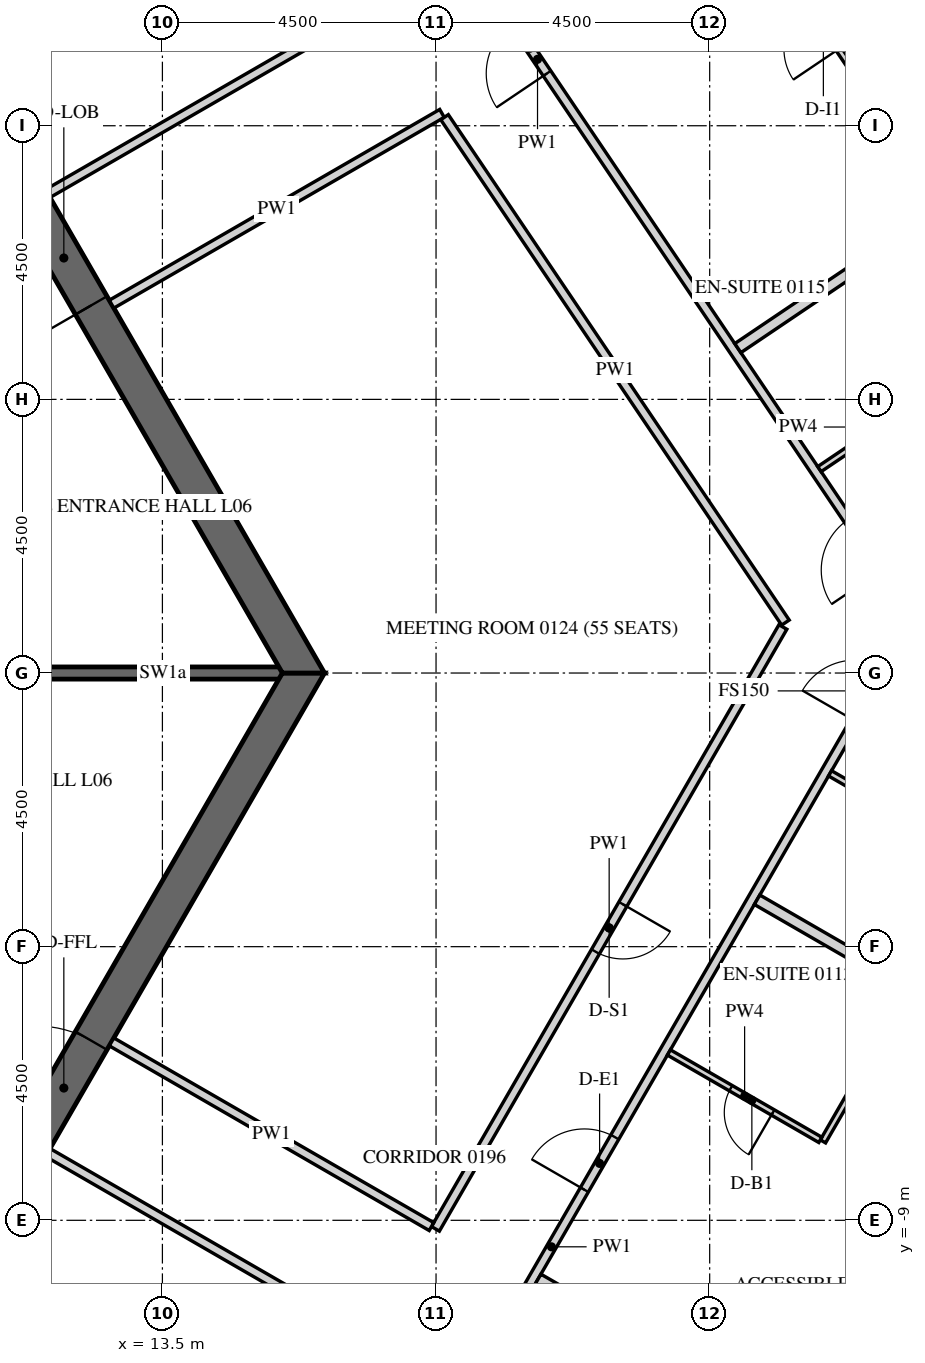
"""IFC4 building model, lengths in metres.
Left out: names, types, materials, properties, quantities, classifications, styles, units other than length and angle.
Written with IfcOpenShell. Run it as: python <this file> out.ifc"""

import sys

from ifc_helpers import new_model, si_unit, direction, frame, frame_2d, origin, place, context, subcontext, project, spatial, polyline, rectangle, outline, extrude, element, fill, save


model = new_model("IFC4")
c1 = context("Model", 3, precision=1e-05, world=origin(), true_north=direction((0.0, 1.0)))
c2 = subcontext(c1, "Body", "Model", "MODEL_VIEW")
j1 = project(units=[si_unit("LENGTHUNIT", "METRE"), si_unit("PLANEANGLEUNIT", "RADIAN")], contexts=[c1])
p1 = place(None, origin())
s1 = spatial("IfcSite", under=j1, at=p1, CompositionType="ELEMENT")
p2 = place(p1, origin())
s2 = spatial("IfcBuilding", under=s1, at=p2, CompositionType="ELEMENT")
p3 = place(p2, frame((0.0, 0.0, 37.5)))
s3 = spatial("IfcBuildingStorey", under=s2, at=p3, CompositionType="ELEMENT", Elevation=37.5)
p4 = place(p3, frame((18.83, -26.835, -0.15), z_axis=(0.0, 0.0, 1.0), x_axis=(0.500003800416, 0.866023209602, 0.0)))
e1 = element("IfcWall", 1, at=p4, inside=s3, PredefinedType="SOLIDWALL", context=c2, shape_type="SweptSolid", body=[
    extrude(outline(polyline([(-0.022, -0.275), (30.097, -0.275), (30.045, 0.275), (0.022, 0.275), (-0.022, -0.275)])), origin(), (0.0, 0.0, 1.0), 3.9),
])
p5 = place(p4, frame((1.236, 0.0, 1.05)))
e2 = element("IfcOpeningElement", 2, at=p5, cuts=e1, PredefinedType="OPENING", context=c2, shape_type="SweptSolid", body=[
    extrude(rectangle(XDim=2.4, YDim=2.4, at=frame_2d((1.2, 1.2))), frame((0.0, 0.285, 0.0), z_axis=(0.0, -1.0, 0.0), x_axis=(1.0, 0.0, 0.0)), (0.0, 0.0, 1.0), 0.57),
])
p6 = place(p4, frame((4.835, 0.0, 1.05)))
e3 = element("IfcOpeningElement", 3, at=p6, cuts=e1, PredefinedType="OPENING", context=c2, shape_type="SweptSolid", body=[
    extrude(rectangle(XDim=2.4, YDim=2.4, at=frame_2d((1.2, 1.2))), frame((0.0, 0.285, 0.0), z_axis=(0.0, -1.0, 0.0), x_axis=(1.0, 0.0, 0.0)), (0.0, 0.0, 1.0), 0.57),
])
p7 = place(p4, frame((8.436, 0.0, 1.05)))
e4 = element("IfcOpeningElement", 4, at=p7, cuts=e1, PredefinedType="OPENING", context=c2, shape_type="SweptSolid", body=[
    extrude(rectangle(XDim=2.4, YDim=2.4, at=frame_2d((1.2, 1.2))), frame((0.0, 0.285, 0.0), z_axis=(0.0, -1.0, 0.0), x_axis=(1.0, 0.0, 0.0)), (0.0, 0.0, 1.0), 0.57),
])
p8 = place(p4, frame((12.035, 0.0, 1.05)))
e5 = element("IfcOpeningElement", 5, at=p8, cuts=e1, PredefinedType="OPENING", context=c2, shape_type="SweptSolid", body=[
    extrude(rectangle(XDim=2.4, YDim=2.4, at=frame_2d((1.2, 1.2))), frame((0.0, 0.285, 0.0), z_axis=(0.0, -1.0, 0.0), x_axis=(1.0, 0.0, 0.0)), (0.0, 0.0, 1.0), 0.57),
])
p9 = place(p4, frame((15.635, 0.0, 1.05)))
e6 = element("IfcOpeningElement", 6, at=p9, cuts=e1, PredefinedType="OPENING", context=c2, shape_type="SweptSolid", body=[
    extrude(rectangle(XDim=2.4, YDim=2.4, at=frame_2d((1.2, 1.2))), frame((0.0, 0.285, 0.0), z_axis=(0.0, -1.0, 0.0), x_axis=(1.0, 0.0, 0.0)), (0.0, 0.0, 1.0), 0.57),
])
p10 = place(p4, frame((19.236, 0.0, 1.05)))
e7 = element("IfcOpeningElement", 7, at=p10, cuts=e1, PredefinedType="OPENING", context=c2, shape_type="SweptSolid", body=[
    extrude(rectangle(XDim=2.4, YDim=2.4, at=frame_2d((1.2, 1.2))), frame((0.0, 0.285, 0.0), z_axis=(0.0, -1.0, 0.0), x_axis=(1.0, 0.0, 0.0)), (0.0, 0.0, 1.0), 0.57),
])
p11 = place(p4, frame((22.835, 0.0, 1.05)))
e8 = element("IfcOpeningElement", 8, at=p11, cuts=e1, PredefinedType="OPENING", context=c2, shape_type="SweptSolid", body=[
    extrude(rectangle(XDim=2.4, YDim=2.4, at=frame_2d((1.2, 1.2))), frame((0.0, 0.285, 0.0), z_axis=(0.0, -1.0, 0.0), x_axis=(1.0, 0.0, 0.0)), (0.0, 0.0, 1.0), 0.57),
])
p12 = place(p4, frame((26.436, 0.0, 1.05)))
e9 = element("IfcOpeningElement", 9, at=p12, cuts=e1, PredefinedType="OPENING", context=c2, shape_type="SweptSolid", body=[
    extrude(rectangle(XDim=2.4, YDim=2.4, at=frame_2d((1.2, 1.2))), frame((0.0, 0.285, 0.0), z_axis=(0.0, -1.0, 0.0), x_axis=(1.0, 0.0, 0.0)), (0.0, 0.0, 1.0), 0.57),
])
p13 = place(p3, frame((33.728, 3.153, -0.15), z_axis=(0.0, 0.0, 1.0), x_axis=(-0.559192411416, 0.82903790445, 0.0)))
e10 = element("IfcWall", 10, at=p13, inside=s3, PredefinedType="SOLIDWALL", context=c2, shape_type="SweptSolid", body=[
    extrude(outline(polyline([(-0.026, -0.275), (30.093, -0.275), (30.048, 0.275), (0.026, 0.275), (-0.026, -0.275)])), origin(), (0.0, 0.0, 1.0), 3.9),
])
p14 = place(p13, frame((1.236, 0.0, 1.05)))
e11 = element("IfcOpeningElement", 11, at=p14, cuts=e10, PredefinedType="OPENING", context=c2, shape_type="SweptSolid", body=[
    extrude(rectangle(XDim=2.4, YDim=2.4, at=frame_2d((1.2, 1.2))), frame((0.0, 0.285, 0.0), z_axis=(0.0, -1.0, 0.0), x_axis=(1.0, 0.0, 0.0)), (0.0, 0.0, 1.0), 0.57),
])
p15 = place(p13, frame((4.835, 0.0, 1.05)))
e12 = element("IfcOpeningElement", 12, at=p15, cuts=e10, PredefinedType="OPENING", context=c2, shape_type="SweptSolid", body=[
    extrude(rectangle(XDim=2.4, YDim=2.4, at=frame_2d((1.2, 1.2))), frame((0.0, 0.285, 0.0), z_axis=(0.0, -1.0, 0.0), x_axis=(1.0, 0.0, 0.0)), (0.0, 0.0, 1.0), 0.57),
])
p16 = place(p13, frame((8.436, 0.0, 1.05)))
e13 = element("IfcOpeningElement", 13, at=p16, cuts=e10, PredefinedType="OPENING", context=c2, shape_type="SweptSolid", body=[
    extrude(rectangle(XDim=2.4, YDim=2.4, at=frame_2d((1.2, 1.2))), frame((0.0, 0.285, 0.0), z_axis=(0.0, -1.0, 0.0), x_axis=(1.0, 0.0, 0.0)), (0.0, 0.0, 1.0), 0.57),
])
p17 = place(p13, frame((12.035, 0.0, 1.05)))
e14 = element("IfcOpeningElement", 14, at=p17, cuts=e10, PredefinedType="OPENING", context=c2, shape_type="SweptSolid", body=[
    extrude(rectangle(XDim=2.4, YDim=2.4, at=frame_2d((1.2, 1.2))), frame((0.0, 0.285, 0.0), z_axis=(0.0, -1.0, 0.0), x_axis=(1.0, 0.0, 0.0)), (0.0, 0.0, 1.0), 0.57),
])
p18 = place(p13, frame((15.635, 0.0, 1.05)))
e15 = element("IfcOpeningElement", 15, at=p18, cuts=e10, PredefinedType="OPENING", context=c2, shape_type="SweptSolid", body=[
    extrude(rectangle(XDim=2.4, YDim=2.4, at=frame_2d((1.2, 1.2))), frame((0.0, 0.285, 0.0), z_axis=(0.0, -1.0, 0.0), x_axis=(1.0, 0.0, 0.0)), (0.0, 0.0, 1.0), 0.57),
])
p19 = place(p13, frame((19.236, 0.0, 1.05)))
e16 = element("IfcOpeningElement", 16, at=p19, cuts=e10, PredefinedType="OPENING", context=c2, shape_type="SweptSolid", body=[
    extrude(rectangle(XDim=2.4, YDim=2.4, at=frame_2d((1.2, 1.2))), frame((0.0, 0.285, 0.0), z_axis=(0.0, -1.0, 0.0), x_axis=(1.0, 0.0, 0.0)), (0.0, 0.0, 1.0), 0.57),
])
p20 = place(p13, frame((22.835, 0.0, 1.05)))
e17 = element("IfcOpeningElement", 17, at=p20, cuts=e10, PredefinedType="OPENING", context=c2, shape_type="SweptSolid", body=[
    extrude(rectangle(XDim=2.4, YDim=2.4, at=frame_2d((1.2, 1.2))), frame((0.0, 0.285, 0.0), z_axis=(0.0, -1.0, 0.0), x_axis=(1.0, 0.0, 0.0)), (0.0, 0.0, 1.0), 0.57),
])
p21 = place(p13, frame((26.436, 0.0, 1.05)))
e18 = element("IfcOpeningElement", 18, at=p21, cuts=e10, PredefinedType="OPENING", context=c2, shape_type="SweptSolid", body=[
    extrude(rectangle(XDim=2.4, YDim=2.4, at=frame_2d((1.2, 1.2))), frame((0.0, 0.285, 0.0), z_axis=(0.0, -1.0, 0.0), x_axis=(1.0, 0.0, 0.0)), (0.0, 0.0, 1.0), 0.57),
])
p22 = place(p3, frame((7.91, -13.7, -0.15), z_axis=(0.0, 0.0, 1.0), x_axis=(0.499999880136, 0.866025472988, 0.0)))
e19 = element("IfcWall", 19, at=p22, inside=s3, PredefinedType="SHEAR", context=c2, shape_type="SweptSolid", body=[
    extrude(outline(polyline([(-0.173, -0.3), (15.993, -0.3), (15.646, 0.3), (0.173, 0.3), (-0.173, -0.3)])), origin(), (0.0, 0.0, 1.0), 3.9),
])
p23 = place(p22, frame((7.039, 0.0, 0.15)))
e20 = element("IfcOpeningElement", 20, at=p23, cuts=e19, PredefinedType="OPENING", context=c2, shape_type="SweptSolid", body=[
    extrude(rectangle(XDim=1.8, YDim=2.4, at=frame_2d((0.9, 1.2))), frame((0.0, 0.31, 0.0), z_axis=(0.0, -1.0, 0.0), x_axis=(1.0, 0.0, 0.0)), (0.0, 0.0, 1.0), 0.62),
])
p24 = place(p3, frame((15.819, 0.0, -0.15), z_axis=(0.0, 0.0, 1.0), x_axis=(-0.499999880136, 0.866025472988, 0.0)))
e21 = element("IfcWall", 21, at=p24, inside=s3, PredefinedType="SHEAR", context=c2, shape_type="SweptSolid", body=[
    extrude(outline(polyline([(-0.173, -0.3), (15.993, -0.3), (15.646, 0.3), (0.173, 0.3), (-0.173, -0.3)])), origin(), (0.0, 0.0, 1.0), 3.9),
])
p25 = place(p24, frame((6.981, 0.0, 0.15)))
e22 = element("IfcOpeningElement", 22, at=p25, cuts=e21, PredefinedType="OPENING", context=c2, shape_type="SweptSolid", body=[
    extrude(rectangle(XDim=1.8, YDim=2.4, at=frame_2d((0.9, 1.2))), frame((0.0, 0.31, 0.0), z_axis=(0.0, -1.0, 0.0), x_axis=(1.0, 0.0, 0.0)), (0.0, 0.0, 1.0), 0.62),
])
p26 = place(p3, frame((11.547, 0.0, -0.15), z_axis=(0.0, 0.0, 1.0), x_axis=(1.0, 0.0, 0.0)))
e23 = element("IfcWall", 23, at=p26, inside=s3, PredefinedType="SHEAR", context=c2, shape_type="SweptSolid", body=[
    extrude(rectangle(XDim=3.926, YDim=0.2, at=frame_2d((1.963, 0.0))), origin(), (0.0, 0.0, 1.0), 3.9),
])
p27 = place(p3, frame((13.928, -19.775, 0.0), z_axis=(0.0, 0.0, 1.0), x_axis=(0.50000450071, 0.866022805283, 0.0)))
e24 = element("IfcWall", 24, at=p27, inside=s3, PredefinedType="PARTITIONING", context=c2, shape_type="SweptSolid", body=[
    extrude(rectangle(XDim=23.877, YDim=0.15, at=frame_2d((11.938, 0.0))), origin(), (0.0, 0.0, 1.0), 2.988),
])
p28 = place(p27, frame((8.573, 0.0, 0.0)))
e25 = element("IfcOpeningElement", 25, at=p28, cuts=e24, PredefinedType="OPENING", context=c2, shape_type="SweptSolid", body=[
    extrude(rectangle(XDim=1.0, YDim=2.1, at=frame_2d((0.5, 1.05))), frame((0.0, 0.085, 0.0), z_axis=(0.0, -1.0, 0.0), x_axis=(1.0, 0.0, 0.0)), (0.0, 0.0, 1.0), 0.17),
])
p29 = place(p27, frame((13.022, 0.0, 0.0)))
e26 = element("IfcOpeningElement", 26, at=p29, cuts=e24, PredefinedType="OPENING", context=c2, shape_type="SweptSolid", body=[
    extrude(rectangle(XDim=1.0, YDim=2.1, at=frame_2d((0.5, 1.05))), frame((0.0, 0.085, 0.0), z_axis=(0.0, -1.0, 0.0), x_axis=(1.0, 0.0, 0.0)), (0.0, 0.0, 1.0), 0.17),
])
p30 = place(p27, frame((21.925, 0.0, 0.0)))
e27 = element("IfcOpeningElement", 27, at=p30, cuts=e24, PredefinedType="OPENING", context=c2, shape_type="SweptSolid", body=[
    extrude(rectangle(XDim=1.0, YDim=2.1, at=frame_2d((0.5, 1.05))), frame((0.0, 0.085, 0.0), z_axis=(0.0, -1.0, 0.0), x_axis=(1.0, 0.0, 0.0)), (0.0, 0.0, 1.0), 0.17),
])
p31 = place(p3, frame((25.821, 0.972, 0.0), z_axis=(0.0, 0.0, 1.0), x_axis=(-0.559193816298, 0.829036956845, 0.0)))
e28 = element("IfcWall", 28, at=p31, inside=s3, PredefinedType="PARTITIONING", context=c2, shape_type="SweptSolid", body=[
    extrude(rectangle(XDim=22.002, YDim=0.15, at=frame_2d((11.001, 0.0))), origin(), (0.0, 0.0, 1.0), 2.988),
])
p32 = place(p31, frame((0.869, 0.0, 0.0)))
e29 = element("IfcOpeningElement", 29, at=p32, cuts=e28, PredefinedType="OPENING", context=c2, shape_type="SweptSolid", body=[
    extrude(rectangle(XDim=1.0, YDim=2.1, at=frame_2d((0.5, 1.05))), frame((0.0, 0.085, 0.0), z_axis=(0.0, -1.0, 0.0), x_axis=(1.0, 0.0, 0.0)), (0.0, 0.0, 1.0), 0.17),
])
p33 = place(p31, frame((10.721, 0.0, 0.0)))
e30 = element("IfcOpeningElement", 30, at=p33, cuts=e28, PredefinedType="OPENING", context=c2, shape_type="SweptSolid", body=[
    extrude(rectangle(XDim=1.0, YDim=2.1, at=frame_2d((0.5, 1.05))), frame((0.0, 0.085, 0.0), z_axis=(0.0, -1.0, 0.0), x_axis=(1.0, 0.0, 0.0)), (0.0, 0.0, 1.0), 0.17),
])
p34 = place(p3, frame((12.664, 6.066, 0.0), z_axis=(0.0, 0.0, 1.0), x_axis=(0.866036561919, 0.499980673046, 0.0)))
e31 = element("IfcWall", 31, at=p34, inside=s3, PredefinedType="PARTITIONING", context=c2, shape_type="SweptSolid", body=[
    extrude(rectangle(XDim=6.275, YDim=0.15, at=frame_2d((3.137, 0.0))), origin(), (0.0, 0.0, 1.0), 2.988),
])
p35 = place(p3, frame((18.14, 9.141, 0.0), z_axis=(0.0, 0.0, 1.0), x_axis=(0.55918799196, -0.829040885389, 0.0)))
e32 = element("IfcWall", 32, at=p35, inside=s3, PredefinedType="PARTITIONING", context=c2, shape_type="SweptSolid", body=[
    extrude(rectangle(XDim=10.025, YDim=0.15, at=frame_2d((5.013, 0.0))), origin(), (0.0, 0.0, 1.0), 2.988),
])
p36 = place(p3, frame((23.704, 0.757, 0.0), z_axis=(0.0, 0.0, 1.0), x_axis=(-0.500010297365, -0.866019458516, 0.0)))
e33 = element("IfcWall", 33, at=p36, inside=s3, PredefinedType="PARTITIONING", context=c2, shape_type="SweptSolid", body=[
    extrude(rectangle(XDim=11.429, YDim=0.15, at=frame_2d((5.714, 0.0))), origin(), (0.0, 0.0, 1.0), 2.988),
])
p37 = place(p36, frame((5.264, 0.0, 0.0)))
e34 = element("IfcOpeningElement", 34, at=p37, cuts=e33, PredefinedType="OPENING", context=c2, shape_type="SweptSolid", body=[
    extrude(rectangle(XDim=0.9, YDim=2.1, at=frame_2d((0.45, 1.05))), frame((0.0, 0.085, 0.0), z_axis=(0.0, -1.0, 0.0), x_axis=(1.0, 0.0, 0.0)), (0.0, 0.0, 1.0), 0.17),
])
p38 = place(p3, frame((17.925, -9.103, 0.0), z_axis=(0.0, 0.0, 1.0), x_axis=(-0.866013586754, 0.500020467139, 0.0)))
e35 = element("IfcWall", 35, at=p38, inside=s3, PredefinedType="PARTITIONING", context=c2, shape_type="SweptSolid", body=[
    extrude(rectangle(XDim=6.075, YDim=0.15, at=frame_2d((3.038, 0.0))), origin(), (0.0, 0.0, 1.0), 2.988),
])
p39 = place(p3, frame((11.614, -7.884, 0.0), z_axis=(0.0, 0.0, 1.0), x_axis=(0.866033542371, -0.499985903289, 0.0)))
e36 = element("IfcWall", 36, at=p39, inside=s3, PredefinedType="PARTITIONING", context=c2, shape_type="SweptSolid", body=[
    extrude(rectangle(XDim=6.15, YDim=0.15, at=frame_2d((3.075, 0.0))), origin(), (0.0, 0.0, 1.0), 2.988),
])
p40 = place(p3, frame((16.855, 10.911, 0.0), z_axis=(0.0, 0.0, 1.0), x_axis=(-0.866020343444, -0.500008764664, 0.0)))
e37 = element("IfcWall", 37, at=p40, inside=s3, PredefinedType="PARTITIONING", context=c2, shape_type="SweptSolid", body=[
    extrude(rectangle(XDim=6.053, YDim=0.15, at=frame_2d((3.026, 0.0))), origin(), (0.0, 0.0, 1.0), 2.988),
])
p41 = place(p3, frame((26.11, -13.676, 0.0), z_axis=(0.0, 0.0, 1.0), x_axis=(-0.866014745021, 0.500018461065, 0.0)))
e38 = element("IfcWall", 38, at=p41, inside=s3, PredefinedType="PARTITIONING", context=c2, shape_type="SweptSolid", body=[
    extrude(rectangle(XDim=7.425, YDim=0.18, at=frame_2d((3.712, 0.0))), origin(), (0.0, 0.0, 1.0), 2.988),
])
p42 = place(p3, frame((25.768, -5.269, 0.0), z_axis=(0.0, 0.0, 1.0), x_axis=(-0.499998209175, -0.866026437715, 0.0)))
e39 = element("IfcWall", 39, at=p42, inside=s3, PredefinedType="PARTITIONING", context=c2, shape_type="SweptSolid", body=[
    extrude(rectangle(XDim=2.81, YDim=0.1, at=frame_2d((1.405, 0.0))), origin(), (0.0, 0.0, 1.0), 2.988),
])
p43 = place(p3, frame((24.32, -7.677, 0.0), z_axis=(0.0, 0.0, 1.0), x_axis=(-0.866018712932, 0.500011588718, 0.0)))
e40 = element("IfcWall", 40, at=p43, inside=s3, PredefinedType="PARTITIONING", context=c2, shape_type="SweptSolid", body=[
    extrude(rectangle(XDim=2.875, YDim=0.1, at=frame_2d((1.438, 0.0))), origin(), (0.0, 0.0, 1.0), 2.988),
])
p44 = place(p43, frame((0.9, 0.0, 0.0)))
e41 = element("IfcOpeningElement", 41, at=p44, cuts=e40, PredefinedType="OPENING", context=c2, shape_type="SweptSolid", body=[
    extrude(rectangle(XDim=0.8, YDim=2.1, at=frame_2d((0.4, 1.05))), frame((0.0, 0.06, 0.0), z_axis=(0.0, -1.0, 0.0), x_axis=(1.0, 0.0, 0.0)), (0.0, 0.0, 1.0), 0.12),
])
p45 = place(p3, frame((29.71, -7.441, 0.0), z_axis=(0.0, 0.0, 1.0), x_axis=(-0.866014745021, 0.500018461065, 0.0)))
e42 = element("IfcWall", 42, at=p45, inside=s3, PredefinedType="PARTITIONING", context=c2, shape_type="SweptSolid", body=[
    extrude(rectangle(XDim=7.425, YDim=0.18, at=frame_2d((3.712, 0.0))), origin(), (0.0, 0.0, 1.0), 2.988),
])
p46 = place(p3, frame((24.48, -1.65, 0.0), z_axis=(0.0, 0.0, 1.0), x_axis=(0.866046596414, -0.499963291492, 0.0)))
e43 = element("IfcWall", 43, at=p46, inside=s3, PredefinedType="PARTITIONING", context=c2, shape_type="SweptSolid", body=[
    extrude(rectangle(XDim=2.925, YDim=0.1, at=frame_2d((1.462, 0.0))), origin(), (0.0, 0.0, 1.0), 2.988),
])
p47 = place(p46, frame((1.175, 0.0, 0.0)))
e44 = element("IfcOpeningElement", 44, at=p47, cuts=e43, PredefinedType="OPENING", context=c2, shape_type="SweptSolid", body=[
    extrude(rectangle(XDim=0.8, YDim=2.1, at=frame_2d((0.4, 1.05))), frame((0.0, 0.06, 0.0), z_axis=(0.0, -1.0, 0.0), x_axis=(1.0, 0.0, 0.0)), (0.0, 0.0, 1.0), 0.12),
])
p48 = place(p3, frame((26.357, 4.737, 0.0), z_axis=(0.0, 0.0, 1.0), x_axis=(-0.829094460354, -0.559108554585, 0.0)))
e45 = element("IfcWall", 45, at=p48, inside=s3, PredefinedType="PARTITIONING", context=c2, shape_type="SweptSolid", body=[
    extrude(rectangle(XDim=2.475, YDim=0.1, at=frame_2d((1.238, 0.0))), origin(), (0.0, 0.0, 1.0), 2.988),
])
p49 = place(p48, frame((0.72, 0.0, 0.0)))
e46 = element("IfcOpeningElement", 46, at=p49, cuts=e45, PredefinedType="OPENING", context=c2, shape_type="SweptSolid", body=[
    extrude(rectangle(XDim=0.8, YDim=2.1, at=frame_2d((0.4, 1.05))), frame((0.0, 0.06, 0.0), z_axis=(0.0, -1.0, 0.0), x_axis=(1.0, 0.0, 0.0)), (0.0, 0.0, 1.0), 0.12),
])
p50 = place(p3, frame((29.119, 9.495, 0.0), z_axis=(0.0, 0.0, 1.0), x_axis=(-0.829038452737, -0.559191598545, 0.0)))
e47 = element("IfcWall", 47, at=p50, inside=s3, PredefinedType="PARTITIONING", context=c2, shape_type="SweptSolid", body=[
    extrude(rectangle(XDim=7.425, YDim=0.18, at=frame_2d((3.713, 0.0))), origin(), (0.0, 0.0, 1.0), 2.988),
])
p51 = place(p3, frame((26.333, 7.724, 0.0), z_axis=(0.0, 0.0, 1.0), x_axis=(-0.559185029686, 0.829042883435, 0.0)))
e48 = element("IfcWall", 48, at=p51, inside=s3, PredefinedType="PARTITIONING", context=c2, shape_type="SweptSolid", body=[
    extrude(rectangle(XDim=7.11, YDim=0.1, at=frame_2d((3.555, 0.0))), origin(), (0.0, 0.0, 1.0), 2.988),
])
p52 = place(p51, frame((3.06, 0.0, 0.0)))
e49 = element("IfcOpeningElement", 49, at=p52, cuts=e48, PredefinedType="OPENING", context=c2, shape_type="SweptSolid", body=[
    extrude(rectangle(XDim=0.9, YDim=2.1, at=frame_2d((0.45, 1.05))), frame((0.0, 0.06, 0.0), z_axis=(0.0, -1.0, 0.0), x_axis=(1.0, 0.0, 0.0)), (0.0, 0.0, 1.0), 0.12),
])
p53 = place(p25, origin())
e50 = element("IfcDoor", 50, at=p53, inside=s3, OperationType="DOUBLE_DOOR_SINGLE_SWING", PredefinedType="DOOR", context=c2, shape_type="SweptSolid", body=[
    extrude(rectangle(XDim=1.8, YDim=2.4, at=frame_2d((0.9, 1.2))), frame((0.0, 0.025, 0.0), z_axis=(0.0, -1.0, 0.0), x_axis=(1.0, 0.0, 0.0)), (0.0, 0.0, 1.0), 0.05),
])
fill(e22, e50)
p54 = place(p23, origin())
e51 = element("IfcDoor", 51, at=p54, inside=s3, OperationType="DOUBLE_DOOR_SINGLE_SWING", PredefinedType="DOOR", context=c2, shape_type="SweptSolid", body=[
    extrude(rectangle(XDim=1.8, YDim=2.4, at=frame_2d((0.9, 1.2))), frame((0.0, 0.025, 0.0), z_axis=(0.0, -1.0, 0.0), x_axis=(1.0, 0.0, 0.0)), (0.0, 0.0, 1.0), 0.05),
])
fill(e20, e51)
p55 = place(p29, origin())
e52 = element("IfcDoor", 52, at=p55, inside=s3, OperationType="SINGLE_SWING_RIGHT", PredefinedType="DOOR", context=c2, shape_type="SweptSolid", body=[
    extrude(rectangle(XDim=1.0, YDim=2.1, at=frame_2d((0.5, 1.05))), frame((0.0, 0.025, 0.0), z_axis=(0.0, -1.0, 0.0), x_axis=(1.0, 0.0, 0.0)), (0.0, 0.0, 1.0), 0.05),
])
fill(e26, e52)
p56 = place(p44, origin())
e53 = element("IfcDoor", 53, at=p56, inside=s3, OperationType="SINGLE_SWING_RIGHT", PredefinedType="DOOR", context=c2, shape_type="SweptSolid", body=[
    extrude(rectangle(XDim=0.8, YDim=2.1, at=frame_2d((0.4, 1.05))), frame((0.0, 0.025, 0.0), z_axis=(0.0, -1.0, 0.0), x_axis=(1.0, 0.0, 0.0)), (0.0, 0.0, 1.0), 0.05),
])
fill(e41, e53)
p57 = place(p33, origin())
e54 = element("IfcDoor", 54, at=p57, inside=s3, OperationType="SINGLE_SWING_RIGHT", PredefinedType="DOOR", context=c2, shape_type="SweptSolid", body=[
    extrude(rectangle(XDim=1.0, YDim=2.1, at=frame_2d((0.5, 1.05))), frame((0.0, 0.025, 0.0), z_axis=(0.0, -1.0, 0.0), x_axis=(1.0, 0.0, 0.0)), (0.0, 0.0, 1.0), 0.05),
])
fill(e30, e54)
p58 = place(p37, origin())
e55 = element("IfcDoor", 55, at=p58, inside=s3, OperationType="SINGLE_SWING_LEFT", PredefinedType="DOOR", context=c2, shape_type="SweptSolid", body=[
    extrude(rectangle(XDim=0.9, YDim=2.1, at=frame_2d((0.45, 1.05))), frame((0.0, 0.025, 0.0), z_axis=(0.0, -1.0, 0.0), x_axis=(1.0, 0.0, 0.0)), (0.0, 0.0, 1.0), 0.05),
])
fill(e34, e55)
save(model, sys.argv[1])
